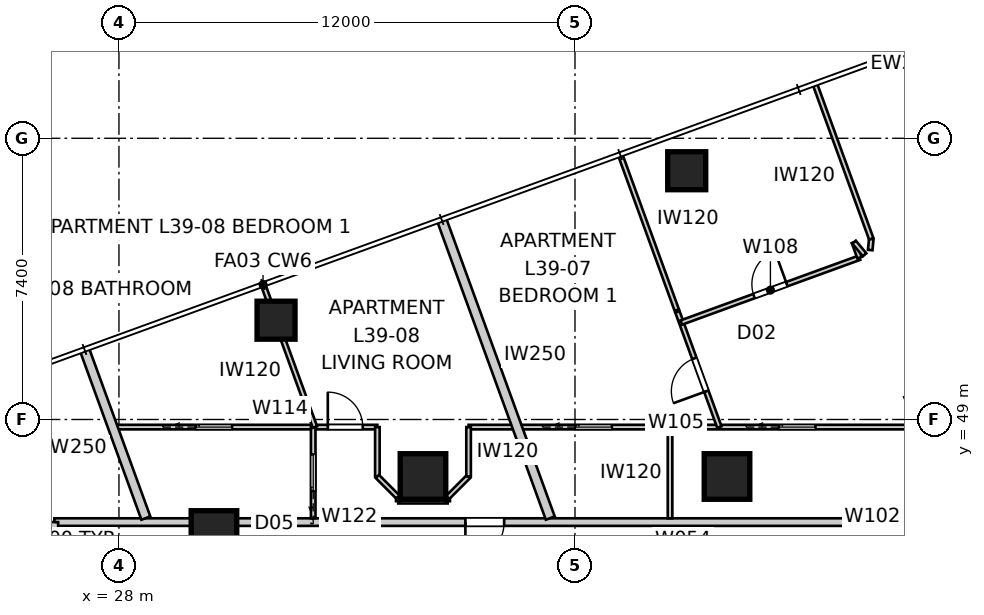
"""IFC4 building model, lengths in metres.
Left out: names, types, materials, properties, quantities, classifications, styles, units other than length and angle.
Written with IfcOpenShell. Run it as: python <this file> out.ifc"""

import sys

from ifc_helpers import new_model, si_unit, direction, frame, frame_2d, origin, origin_2d, place, context, subcontext, project, spatial, rectangle, extrude, element, fill, save


model = new_model("IFC4")
c1 = context("Model", 3, precision=1e-05, world=origin(), true_north=direction((0.0, 1.0)))
c2 = subcontext(c1, "Body", "Model", "MODEL_VIEW")
j1 = project(units=[si_unit("LENGTHUNIT", "METRE"), si_unit("PLANEANGLEUNIT", "RADIAN")], contexts=[c1])
p1 = place(None, origin())
s1 = spatial("IfcSite", under=j1, at=p1, CompositionType="ELEMENT")
p2 = place(p1, origin())
s2 = spatial("IfcBuilding", under=s1, at=p2, CompositionType="ELEMENT")
p3 = place(p2, frame((0.0, 0.0, 143.8)))
s3 = spatial("IfcBuildingStorey", under=s2, at=p3, CompositionType="ELEMENT", Elevation=143.8)
for number, where, z_axis, x_axis in (
    (1, (42.94, 55.546, -0.15), (0.0, 0.0, 1.0), (1.0, 0.0, 0.0)),
    (2, (32.134, 51.613, -0.15), (0.0, 0.0, 1.0), (1.0, 0.0, 0.0)),
):
    element("IfcColumn", number, at=place(p3, frame(where, z_axis=z_axis, x_axis=x_axis)), inside=s3, PredefinedType="COLUMN", context=c2, shape_type="SweptSolid", body=[
        extrude(rectangle(XDim=1.0, YDim=1.0, at=origin_2d()), origin(), (0.0, 0.0, 1.0), 3.55),
    ])
for number, where, z_axis, x_axis in (
    (3, (44.0, 47.5, 0.0), (0.0, 0.0, 1.0), (1.0, 0.0, 0.0)),
    (4, (36.0, 47.5, 0.0), (0.0, 0.0, 1.0), (1.0, 0.0, 0.0)),
    (5, (30.5, 46.0, 0.0), (0.0, 0.0, 1.0), (1.0, 0.0, 0.0)),
):
    element("IfcColumn", number, at=place(p3, frame(where, z_axis=z_axis, x_axis=x_axis)), inside=s3, PredefinedType="COLUMN", context=c2, shape_type="SweptSolid", body=[
        extrude(rectangle(XDim=1.2, YDim=1.2, at=origin_2d()), origin(), (0.0, 0.0, 1.0), 3.4),
    ])
p4 = place(p3, frame((49.242, 46.3, 0.0), z_axis=(0.0, 0.0, 1.0), x_axis=(-1.0, 0.0, 0.0)))
e6 = element("IfcWall", 6, at=p4, inside=s3, PredefinedType="PARTITIONING", context=c2, shape_type="SweptSolid", body=[
    extrude(rectangle(XDim=1.683, YDim=0.2, at=frame_2d((0.842, 0.0))), origin(), (0.0, 0.0, 1.0), 2.55),
])
p5 = place(p3, frame((47.558, 46.3, 0.0), z_axis=(0.0, 0.0, 1.0), x_axis=(-1.0, 0.0, 0.0)))
e7 = element("IfcWall", 7, at=p5, inside=s3, PredefinedType="PARTITIONING", context=c2, shape_type="SweptSolid", body=[
    extrude(rectangle(XDim=15.117, YDim=0.2, at=frame_2d((7.558, 0.0))), origin(), (0.0, 0.0, 1.0), 3.25),
])
p6 = place(p5, frame((9.422, 0.0, 0.0)))
e8 = element("IfcOpeningElement", 8, at=p6, cuts=e7, PredefinedType="OPENING", context=c2, shape_type="SweptSolid", body=[
    extrude(rectangle(XDim=1.02, YDim=2.34, at=frame_2d((0.51, 1.17))), frame((0.0, 0.11, 0.0), z_axis=(0.0, -1.0, 0.0), x_axis=(1.0, 0.0, 0.0)), (0.0, 0.0, 1.0), 0.22),
])
p7 = place(p3, frame((32.442, 46.3, 0.0), z_axis=(0.0, 0.0, 1.0), x_axis=(-1.0, 0.0, 0.0)))
e9 = element("IfcWall", 9, at=p7, inside=s3, PredefinedType="PARTITIONING", context=c2, shape_type="SweptSolid", body=[
    extrude(rectangle(XDim=1.683, YDim=0.2, at=frame_2d((0.842, 0.0))), origin(), (0.0, 0.0, 1.0), 2.55),
])
p8 = place(p3, frame((30.758, 46.3, 0.0), z_axis=(0.0, 0.0, 1.0), x_axis=(-1.0, 0.0, 0.0)))
e10 = element("IfcWall", 10, at=p8, inside=s3, PredefinedType="PARTITIONING", context=c2, shape_type="SweptSolid", body=[
    extrude(rectangle(XDim=4.458, YDim=0.2, at=frame_2d((2.229, 0.0))), origin(), (0.0, 0.0, 1.0), 3.25),
])
p9 = place(p3, frame((26.3, 46.3, 0.0), z_axis=(0.0, 0.0, 1.0), x_axis=(0.0, -1.0, 0.0)))
e11 = element("IfcWall", 11, at=p9, inside=s3, PredefinedType="PARTITIONING", context=c2, shape_type="SweptSolid", body=[
    extrude(rectangle(XDim=33.0, YDim=0.2, at=frame_2d((16.5, 0.0))), origin(), (0.0, 0.0, 1.0), 3.25),
])
p10 = place(p9, frame((13.229, 0.0, 0.0)))
e12 = element("IfcOpeningElement", 12, at=p10, cuts=e11, PredefinedType="OPENING", context=c2, shape_type="SweptSolid", body=[
    extrude(rectangle(XDim=1.02, YDim=2.34, at=frame_2d((0.51, 1.17))), frame((0.0, 0.11, 0.0), z_axis=(0.0, -1.0, 0.0), x_axis=(1.0, 0.0, 0.0)), (0.0, 0.0, 1.0), 0.22),
])
p11 = place(p9, frame((28.51, 0.0, 0.0)))
e13 = element("IfcOpeningElement", 13, at=p11, cuts=e11, PredefinedType="OPENING", context=c2, shape_type="SweptSolid", body=[
    extrude(rectangle(XDim=1.02, YDim=2.34, at=frame_2d((0.51, 1.17))), frame((0.0, 0.11, 0.0), z_axis=(0.0, -1.0, 0.0), x_axis=(1.0, 0.0, 0.0)), (0.0, 0.0, 1.0), 0.22),
])
p12 = place(p9, frame((1.998, 0.0, 0.0)))
e14 = element("IfcOpeningElement", 14, at=p12, cuts=e11, PredefinedType="OPENING", context=c2, shape_type="SweptSolid", body=[
    extrude(rectangle(XDim=1.02, YDim=2.34, at=frame_2d((0.51, 1.17))), frame((0.0, 0.11, 0.0), z_axis=(0.0, -1.0, 0.0), x_axis=(1.0, 0.0, 0.0)), (0.0, 0.0, 1.0), 0.22),
])
p13 = place(p3, frame((36.49, 54.263, 0.0), z_axis=(0.0, 0.0, 1.0), x_axis=(0.342019678743, -0.93969278988, 0.0)))
e15 = element("IfcWall", 15, at=p13, inside=s3, PredefinedType="PARTITIONING", context=c2, shape_type="SweptSolid", body=[
    extrude(rectangle(XDim=8.362, YDim=0.25, at=frame_2d((4.181, 0.0))), origin(), (0.0, 0.0, 1.0), 3.25),
])
p14 = place(p3, frame((27.093, 50.843, 0.0), z_axis=(0.0, 0.0, 1.0), x_axis=(0.342012883883, -0.939695262975, 0.0)))
e16 = element("IfcWall", 16, at=p14, inside=s3, PredefinedType="PARTITIONING", context=c2, shape_type="SweptSolid", body=[
    extrude(rectangle(XDim=4.722, YDim=0.25, at=frame_2d((2.361, 0.0))), origin(), (0.0, 0.0, 1.0), 3.25),
])
p15 = place(p3, frame((42.501, 46.4, 0.0), z_axis=(0.0, 0.0, 1.0), x_axis=(0.0, 1.0, 0.0)))
e17 = element("IfcWall", 17, at=p15, inside=s3, PredefinedType="PARTITIONING", context=c2, shape_type="SweptSolid", body=[
    extrude(rectangle(XDim=2.4, YDim=0.12, at=frame_2d((1.2, 0.0))), origin(), (0.0, 0.0, 1.0), 3.25),
])
p16 = place(p3, frame((37.2, 48.8, 0.0), z_axis=(0.0, 0.0, 1.0), x_axis=(1.0, 0.0, 0.0)))
e18 = element("IfcWall", 18, at=p16, inside=s3, PredefinedType="PARTITIONING", context=c2, shape_type="SweptSolid", body=[
    extrude(rectangle(XDim=19.8, YDim=0.12, at=frame_2d((9.9, 0.0))), origin(), (0.0, 0.0, 1.0), 3.25),
])
p17 = place(p16, frame((15.403, 0.0, 0.0)))
e19 = element("IfcOpeningElement", 19, at=p17, cuts=e18, PredefinedType="OPENING", context=c2, shape_type="SweptSolid", body=[
    extrude(rectangle(XDim=0.92, YDim=2.34, at=frame_2d((0.46, 1.17))), frame((0.0, 0.07, 0.0), z_axis=(0.0, -1.0, 0.0), x_axis=(1.0, 0.0, 0.0)), (0.0, 0.0, 1.0), 0.14),
])
p18 = place(p16, frame((8.165, 0.0, 0.0)))
e20 = element("IfcOpeningElement", 20, at=p18, cuts=e18, PredefinedType="OPENING", context=c2, shape_type="SweptSolid", body=[
    extrude(rectangle(XDim=0.96, YDim=2.1, at=frame_2d((0.48, 1.05))), frame((0.0, 0.07, 0.0), z_axis=(0.0, -1.0, 0.0), x_axis=(1.0, 0.0, 0.0)), (0.0, 0.0, 1.0), 0.14),
])
p19 = place(p16, frame((2.81, 0.0, 0.0)))
e21 = element("IfcOpeningElement", 21, at=p19, cuts=e18, PredefinedType="OPENING", context=c2, shape_type="SweptSolid", body=[
    extrude(rectangle(XDim=0.96, YDim=2.1, at=frame_2d((0.48, 1.05))), frame((0.0, 0.07, 0.0), z_axis=(0.0, -1.0, 0.0), x_axis=(1.0, 0.0, 0.0)), (0.0, 0.0, 1.0), 0.14),
])
p20 = place(p3, frame((43.799, 48.8, 0.0), z_axis=(0.0, 0.0, 1.0), x_axis=(-0.342034943783, 0.939687233728, 0.0)))
e22 = element("IfcWall", 22, at=p20, inside=s3, PredefinedType="PARTITIONING", context=c2, shape_type="SweptSolid", body=[
    extrude(rectangle(XDim=3.223, YDim=0.12, at=frame_2d((1.612, 0.0))), origin(), (0.0, 0.0, 1.0), 3.25),
])
p21 = place(p20, frame((1.004, 0.0, 0.0)))
e23 = element("IfcOpeningElement", 23, at=p21, cuts=e22, PredefinedType="OPENING", context=c2, shape_type="SweptSolid", body=[
    extrude(rectangle(XDim=0.92, YDim=2.34, at=frame_2d((0.46, 1.17))), frame((0.0, 0.07, 0.0), z_axis=(0.0, -1.0, 0.0), x_axis=(1.0, 0.0, 0.0)), (0.0, 0.0, 1.0), 0.14),
])
p22 = place(p3, frame((48.717, 49.615, 0.0), z_axis=(0.0, 0.0, 1.0), x_axis=(0.448117513314, -0.893974660861, 0.0)))
e24 = element("IfcWall", 24, at=p22, inside=s3, PredefinedType="PARTITIONING", context=c2, shape_type="SweptSolid", body=[
    extrude(rectangle(XDim=0.864, YDim=0.12, at=frame_2d((0.432, 0.0))), origin(), (0.0, 0.0, 1.0), 3.25),
])
p23 = place(p3, frame((42.798, 51.551, 0.0), z_axis=(0.0, 0.0, 1.0), x_axis=(0.939699104319, 0.342002329438, 0.0)))
e25 = element("IfcWall", 25, at=p23, inside=s3, PredefinedType="PARTITIONING", context=c2, shape_type="SweptSolid", body=[
    extrude(rectangle(XDim=4.99, YDim=0.12, at=frame_2d((2.495, 0.0))), origin(), (0.0, 0.0, 1.0), 3.25),
])
p24 = place(p23, frame((2.035, 0.0, 0.0)))
e26 = element("IfcOpeningElement", 26, at=p24, cuts=e25, PredefinedType="OPENING", context=c2, shape_type="SweptSolid", body=[
    extrude(rectangle(XDim=0.92, YDim=2.34, at=frame_2d((0.46, 1.17))), frame((0.0, 0.07, 0.0), z_axis=(0.0, -1.0, 0.0), x_axis=(1.0, 0.0, 0.0)), (0.0, 0.0, 1.0), 0.14),
])
for number, where, z_axis, x_axis in (
    (27, (47.487, 53.258, 0.0), (0.0, 0.0, 1.0), (-0.342, 0.94, 0.0)),
    (28, (47.344, 53.667, 0.0), (0.0, 0.0, 1.0), (0.639, -0.77, 0.0)),
):
    element("IfcWall", number, at=place(p3, frame(where, z_axis=z_axis, x_axis=x_axis)), inside=s3, PredefinedType="PARTITIONING", context=c2, shape_type="SweptSolid", body=[
        extrude(rectangle(XDim=0.433, YDim=0.12, at=frame_2d((0.216, 0.0))), origin(), (0.0, 0.0, 1.0), 3.25),
    ])
p25 = place(p3, frame((47.769, 53.458, 0.0), z_axis=(0.0, 0.0, 1.0), x_axis=(0.093212941297, 0.995646195983, 0.0)))
e29 = element("IfcWall", 29, at=p25, inside=s3, PredefinedType="PARTITIONING", context=c2, shape_type="SweptSolid", body=[
    extrude(rectangle(XDim=0.296, YDim=0.12, at=frame_2d((0.148, 0.0))), origin(), (0.0, 0.0, 1.0), 3.25),
])
p26 = place(p3, frame((47.796, 53.752, 0.0), z_axis=(0.0, 0.0, 1.0), x_axis=(-0.342011603146, 0.939695729113, 0.0)))
e30 = element("IfcWall", 30, at=p26, inside=s3, PredefinedType="PARTITIONING", context=c2, shape_type="SweptSolid", body=[
    extrude(rectangle(XDim=4.307, YDim=0.12, at=frame_2d((2.153, 0.0))), origin(), (0.0, 0.0, 1.0), 3.25),
])
p27 = place(p3, frame((41.202, 55.935, 0.0), z_axis=(0.0, 0.0, 1.0), x_axis=(0.341992887332, -0.939702540709, 0.0)))
e31 = element("IfcWall", 31, at=p27, inside=s3, PredefinedType="PARTITIONING", context=c2, shape_type="SweptSolid", body=[
    extrude(rectangle(XDim=4.315, YDim=0.12, at=frame_2d((2.158, 0.0))), origin(), (0.0, 0.0, 1.0), 3.25),
])
p28 = place(p3, frame((27.836, 48.8, 0.0), z_axis=(0.0, 0.0, 1.0), x_axis=(1.0, 0.0, 0.0)))
e32 = element("IfcWall", 32, at=p28, inside=s3, PredefinedType="PARTITIONING", context=c2, shape_type="SweptSolid", body=[
    extrude(rectangle(XDim=6.964, YDim=0.12, at=frame_2d((3.482, 0.0))), origin(), (0.0, 0.0, 1.0), 3.25),
])
p29 = place(p28, frame((5.659, 0.0, 0.0)))
e33 = element("IfcOpeningElement", 33, at=p29, cuts=e32, PredefinedType="OPENING", context=c2, shape_type="SweptSolid", body=[
    extrude(rectangle(XDim=0.92, YDim=2.34, at=frame_2d((0.46, 1.17))), frame((0.0, 0.07, 0.0), z_axis=(0.0, -1.0, 0.0), x_axis=(1.0, 0.0, 0.0)), (0.0, 0.0, 1.0), 0.14),
])
p30 = place(p28, frame((2.18, 0.0, 0.0)))
e34 = element("IfcOpeningElement", 34, at=p30, cuts=e32, PredefinedType="OPENING", context=c2, shape_type="SweptSolid", body=[
    extrude(rectangle(XDim=0.96, YDim=2.1, at=frame_2d((0.48, 1.05))), frame((0.0, 0.07, 0.0), z_axis=(0.0, -1.0, 0.0), x_axis=(1.0, 0.0, 0.0)), (0.0, 0.0, 1.0), 0.14),
])
p31 = place(p3, frame((34.8, 48.8, 0.0), z_axis=(0.0, 0.0, 1.0), x_axis=(0.0, -1.0, 0.0)))
e35 = element("IfcWall", 35, at=p31, inside=s3, PredefinedType="PARTITIONING", context=c2, shape_type="SweptSolid", body=[
    extrude(rectangle(XDim=1.3, YDim=0.12, at=frame_2d((0.65, 0.0))), origin(), (0.0, 0.0, 1.0), 3.25),
])
p32 = place(p3, frame((34.8, 47.5, 0.0), z_axis=(0.0, 0.0, 1.0), x_axis=(0.707106781187, -0.707106781187, 0.0)))
e36 = element("IfcWall", 36, at=p32, inside=s3, PredefinedType="PARTITIONING", context=c2, shape_type="SweptSolid", body=[
    extrude(rectangle(XDim=0.778, YDim=0.12, at=frame_2d((0.389, 0.0))), origin(), (0.0, 0.0, 1.0), 3.25),
])
p33 = place(p3, frame((35.35, 46.85, 0.0), z_axis=(0.0, 0.0, 1.0), x_axis=(1.0, 0.0, 0.0)))
e37 = element("IfcWall", 37, at=p33, inside=s3, PredefinedType="PARTITIONING", context=c2, shape_type="SweptSolid", body=[
    extrude(rectangle(XDim=1.3, YDim=0.12, at=frame_2d((0.65, 0.0))), origin(), (0.0, 0.0, 1.0), 3.25),
])
p34 = place(p3, frame((36.65, 46.95, 0.0), z_axis=(0.0, 0.0, 1.0), x_axis=(0.707106781187, 0.707106781187, 0.0)))
e38 = element("IfcWall", 38, at=p34, inside=s3, PredefinedType="PARTITIONING", context=c2, shape_type="SweptSolid", body=[
    extrude(rectangle(XDim=0.778, YDim=0.12, at=frame_2d((0.389, 0.0))), origin(), (0.0, 0.0, 1.0), 3.25),
])
p35 = place(p3, frame((37.2, 47.5, 0.0), z_axis=(0.0, 0.0, 1.0), x_axis=(0.0, 1.0, 0.0)))
e39 = element("IfcWall", 39, at=p35, inside=s3, PredefinedType="PARTITIONING", context=c2, shape_type="SweptSolid", body=[
    extrude(rectangle(XDim=1.3, YDim=0.12, at=frame_2d((0.65, 0.0))), origin(), (0.0, 0.0, 1.0), 3.25),
])
p36 = place(p3, frame((33.112, 46.4, 0.0), z_axis=(0.0, 0.0, 1.0), x_axis=(0.0, 1.0, 0.0)))
e40 = element("IfcWall", 40, at=p36, inside=s3, PredefinedType="PARTITIONING", context=c2, shape_type="SweptSolid", body=[
    extrude(rectangle(XDim=2.4, YDim=0.12, at=frame_2d((1.2, 0.0))), origin(), (0.0, 0.0, 1.0), 3.25),
])
p37 = place(p36, frame((0.72, 0.0, 0.0)))
e41 = element("IfcOpeningElement", 41, at=p37, cuts=e40, PredefinedType="OPENING", context=c2, shape_type="SweptSolid", body=[
    extrude(rectangle(XDim=0.96, YDim=2.1, at=frame_2d((0.48, 1.05))), frame((0.0, 0.07, 0.0), z_axis=(0.0, -1.0, 0.0), x_axis=(1.0, 0.0, 0.0)), (0.0, 0.0, 1.0), 0.14),
])
p38 = place(p3, frame((33.157, 48.8, 0.0), z_axis=(0.0, 0.0, 1.0), x_axis=(-0.341990966768, 0.939703239672, 0.0)))
e42 = element("IfcWall", 42, at=p38, inside=s3, PredefinedType="PARTITIONING", context=c2, shape_type="SweptSolid", body=[
    extrude(rectangle(XDim=3.953, YDim=0.12, at=frame_2d((1.977, 0.0))), origin(), (0.0, 0.0, 1.0), 3.25),
])
for number, where, z_axis, x_axis in (
    (43, (35.35, 46.85, 0.0), (0.0, 0.0, 1.0), (0.0, 1.0, 0.0)),
    (44, (36.65, 46.85, 0.0), (0.0, 0.0, 1.0), (0.0, 1.0, 0.0)),
):
    element("IfcWall", number, at=place(p3, frame(where, z_axis=z_axis, x_axis=x_axis)), inside=s3, PredefinedType="PARTITIONING", context=c2, shape_type="SweptSolid", body=[
        extrude(rectangle(XDim=0.1, YDim=0.12, at=frame_2d((0.05, 0.0))), origin(), (0.0, 0.0, 1.0), 3.25),
    ])
p39 = place(p6, origin())
e45 = element("IfcDoor", 45, at=p39, inside=s3, OperationType="SINGLE_SWING_RIGHT", PredefinedType="DOOR", context=c2, shape_type="SweptSolid", body=[
    extrude(rectangle(XDim=1.02, YDim=2.34, at=frame_2d((0.51, 1.17))), frame((0.0, 0.025, 0.0), z_axis=(0.0, -1.0, 0.0), x_axis=(1.0, 0.0, 0.0)), (0.0, 0.0, 1.0), 0.05),
])
fill(e8, e45)
p40 = place(p37, origin())
e46 = element("IfcDoor", 46, at=p40, inside=s3, OperationType="SLIDING_TO_LEFT", PredefinedType="DOOR", context=c2, shape_type="SweptSolid", body=[
    extrude(rectangle(XDim=0.96, YDim=2.1, at=frame_2d((0.48, 1.05))), frame((0.0, 0.025, 0.0), z_axis=(0.0, -1.0, 0.0), x_axis=(1.0, 0.0, 0.0)), (0.0, 0.0, 1.0), 0.05),
])
fill(e41, e46)
p41 = place(p29, origin())
e47 = element("IfcDoor", 47, at=p41, inside=s3, OperationType="SINGLE_SWING_LEFT", PredefinedType="DOOR", context=c2, shape_type="SweptSolid", body=[
    extrude(rectangle(XDim=0.92, YDim=2.34, at=frame_2d((0.46, 1.17))), frame((0.0, 0.025, 0.0), z_axis=(0.0, -1.0, 0.0), x_axis=(1.0, 0.0, 0.0)), (0.0, 0.0, 1.0), 0.05),
])
fill(e33, e47)
p42 = place(p30, origin())
e48 = element("IfcDoor", 48, at=p42, inside=s3, OperationType="SLIDING_TO_LEFT", PredefinedType="DOOR", context=c2, shape_type="SweptSolid", body=[
    extrude(rectangle(XDim=0.96, YDim=2.1, at=frame_2d((0.48, 1.05))), frame((0.0, 0.025, 0.0), z_axis=(0.0, -1.0, 0.0), x_axis=(1.0, 0.0, 0.0)), (0.0, 0.0, 1.0), 0.05),
])
fill(e34, e48)
p43 = place(p18, origin())
e49 = element("IfcDoor", 49, at=p43, inside=s3, OperationType="SLIDING_TO_LEFT", PredefinedType="DOOR", context=c2, shape_type="SweptSolid", body=[
    extrude(rectangle(XDim=0.96, YDim=2.1, at=frame_2d((0.48, 1.05))), frame((0.0, 0.025, 0.0), z_axis=(0.0, -1.0, 0.0), x_axis=(1.0, 0.0, 0.0)), (0.0, 0.0, 1.0), 0.05),
])
fill(e20, e49)
p44 = place(p24, origin())
e50 = element("IfcDoor", 50, at=p44, inside=s3, OperationType="SINGLE_SWING_RIGHT", PredefinedType="DOOR", context=c2, shape_type="SweptSolid", body=[
    extrude(rectangle(XDim=0.92, YDim=2.34, at=frame_2d((0.46, 1.17))), frame((0.0, 0.025, 0.0), z_axis=(0.0, -1.0, 0.0), x_axis=(1.0, 0.0, 0.0)), (0.0, 0.0, 1.0), 0.05),
])
fill(e26, e50)
p45 = place(p21, origin())
e51 = element("IfcDoor", 51, at=p45, inside=s3, OperationType="SINGLE_SWING_LEFT", PredefinedType="DOOR", context=c2, shape_type="SweptSolid", body=[
    extrude(rectangle(XDim=0.92, YDim=2.34, at=frame_2d((0.46, 1.17))), frame((0.0, 0.025, 0.0), z_axis=(0.0, -1.0, 0.0), x_axis=(1.0, 0.0, 0.0)), (0.0, 0.0, 1.0), 0.05),
])
fill(e23, e51)
p46 = place(p19, origin())
e52 = element("IfcDoor", 52, at=p46, inside=s3, OperationType="SLIDING_TO_LEFT", PredefinedType="DOOR", context=c2, shape_type="SweptSolid", body=[
    extrude(rectangle(XDim=0.96, YDim=2.1, at=frame_2d((0.48, 1.05))), frame((0.0, 0.025, 0.0), z_axis=(0.0, -1.0, 0.0), x_axis=(1.0, 0.0, 0.0)), (0.0, 0.0, 1.0), 0.05),
])
fill(e21, e52)
save(model, sys.argv[1])
